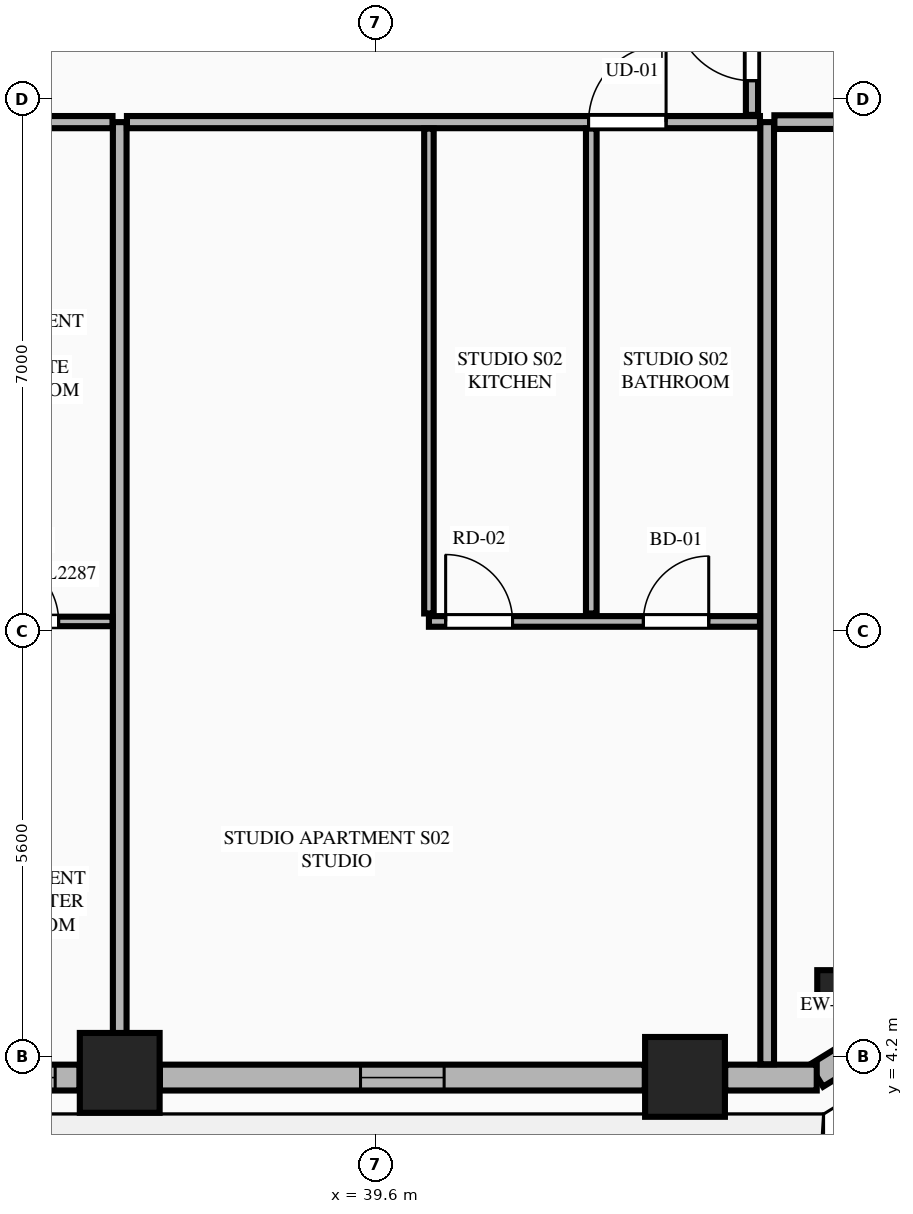
"""IFC4 building model, lengths in metres.
Left out: names, types, materials, properties, quantities, classifications, styles, units other than length and angle.
Written with IfcOpenShell. Run it as: python <this file> out.ifc"""

import sys

from ifc_helpers import new_model, si_unit, direction, frame, frame_2d, origin, origin_2d, place, context, subcontext, project, spatial, rectangle, extrude, element, fill, save


model = new_model("IFC4")
c1 = context("Model", 3, precision=1e-05, world=origin(), true_north=direction((0.0, 1.0)))
c2 = subcontext(c1, "Body", "Model", "MODEL_VIEW")
j1 = project(units=[si_unit("LENGTHUNIT", "METRE"), si_unit("PLANEANGLEUNIT", "RADIAN")], contexts=[c1])
p1 = place(None, origin())
s1 = spatial("IfcSite", under=j1, at=p1, CompositionType="ELEMENT")
p2 = place(p1, origin())
s2 = spatial("IfcBuilding", under=s1, at=p2, CompositionType="ELEMENT")
p3 = place(p2, frame((0.0, 0.0, 109.05)))
s3 = spatial("IfcBuildingStorey", under=s2, at=p3, CompositionType="ELEMENT", Elevation=109.05)
for number, where, z_axis, x_axis in (
    (1, (36.232, 3.992, 0.0), (0.0, 0.0, 1.0), (1.0, 0.0, 0.0)),
    (2, (43.669, 3.939, 0.0), (0.0, 0.0, 1.0), (1.0, 0.0, 0.0)),
):
    element("IfcColumn", number, at=place(p3, frame(where, z_axis=z_axis, x_axis=x_axis)), inside=s3, PredefinedType="COLUMN", context=c2, shape_type="SweptSolid", body=[
        extrude(rectangle(XDim=1.05, YDim=1.05, at=origin_2d()), origin(), (0.0, 0.0, 1.0), 3.55),
    ])
p4 = place(p3, frame((45.659, 5.093, 0.0), z_axis=(0.0, 0.0, 1.0), x_axis=(0.865160173452, 0.501495637342, 0.0)))
e3 = element("IfcColumn", 3, at=p4, inside=s3, PredefinedType="PILASTER", context=c2, shape_type="SweptSolid", body=[
    extrude(rectangle(XDim=0.5, YDim=0.35, at=origin_2d()), origin(), (0.0, 0.0, 1.0), 3.55),
])
p5 = place(p3, frame((45.397, 3.955, 0.0), z_axis=(0.0, 0.0, 1.0), x_axis=(0.851798915137, 0.523868884523, 0.0)))
e4 = element("IfcWall", 4, at=p5, inside=s3, PredefinedType="STANDARD", context=c2, shape_type="SweptSolid", body=[
    extrude(rectangle(XDim=1.848, YDim=0.34, at=frame_2d((0.924, 0.0))), origin(), (0.0, 0.0, 1.0), 3.34),
])
p6 = place(p3, frame((29.097, 3.93, 0.0), z_axis=(0.0, 0.0, 1.0), x_axis=(1.0, 0.0, 0.0)))
e5 = element("IfcWall", 5, at=p6, inside=s3, PredefinedType="STANDARD", context=c2, shape_type="SweptSolid", body=[
    extrude(rectangle(XDim=6.606, YDim=0.34, at=frame_2d((3.303, 0.0))), origin(), (0.0, 0.0, 1.0), 2.797),
])
p7 = place(p6, frame((1.775, 0.0, 0.0)))
e6 = element("IfcOpeningElement", 6, at=p7, cuts=e5, PredefinedType="OPENING", context=c2, shape_type="SweptSolid", body=[
    extrude(rectangle(XDim=1.1, YDim=2.25, at=frame_2d((0.55, 1.125))), frame((0.0, 0.18, 0.0), z_axis=(0.0, -1.0, 0.0), x_axis=(1.0, 0.0, 0.0)), (0.0, 0.0, 1.0), 0.36),
])
p8 = place(p6, frame((5.186, 0.0, 0.75)))
e7 = element("IfcOpeningElement", 7, at=p8, cuts=e5, PredefinedType="OPENING", context=c2, shape_type="SweptSolid", body=[
    extrude(rectangle(XDim=1.1, YDim=1.897, at=frame_2d((0.55, 0.948))), frame((0.0, 0.18, 0.0), z_axis=(0.0, -1.0, 0.0), x_axis=(1.0, 0.0, 0.0)), (0.0, 0.0, 1.0), 0.36),
])
p9 = place(p3, frame((36.761, 3.93, 0.0), z_axis=(0.0, 0.0, 1.0), x_axis=(1.0, 0.0, 0.0)))
e8 = element("IfcWall", 8, at=p9, inside=s3, PredefinedType="STANDARD", context=c2, shape_type="SweptSolid", body=[
    extrude(rectangle(XDim=6.379, YDim=0.34, at=frame_2d((3.189, 0.0))), origin(), (0.0, 0.0, 1.0), 2.797),
])
p10 = place(p9, frame((2.639, 0.0, 0.75)))
e9 = element("IfcOpeningElement", 9, at=p10, cuts=e8, PredefinedType="OPENING", context=c2, shape_type="SweptSolid", body=[
    extrude(rectangle(XDim=1.1, YDim=1.897, at=frame_2d((0.55, 0.948))), frame((0.0, 0.18, 0.0), z_axis=(0.0, -1.0, 0.0), x_axis=(1.0, 0.0, 0.0)), (0.0, 0.0, 1.0), 0.36),
])
p11 = place(p3, frame((44.198, 3.93, 0.0), z_axis=(0.0, 0.0, 1.0), x_axis=(1.0, 0.0, 0.0)))
e10 = element("IfcWall", 10, at=p11, inside=s3, PredefinedType="STANDARD", context=c2, shape_type="SweptSolid", body=[
    extrude(rectangle(XDim=1.204, YDim=0.34, at=frame_2d((0.602, 0.0))), origin(), (0.0, 0.0, 1.0), 3.34),
])
p12 = place(p3, frame((36.232, 4.105, 0.0), z_axis=(0.0, 0.0, 1.0), x_axis=(0.0, 1.0, 0.0)))
e11 = element("IfcWall", 11, at=p12, inside=s3, PredefinedType="PARTITIONING", context=c2, shape_type="SweptSolid", body=[
    extrude(rectangle(XDim=12.395, YDim=0.18, at=frame_2d((6.198, 0.0))), origin(), (0.0, 0.0, 1.0), 2.722),
])
p13 = place(p3, frame((44.75, 4.105, 0.0), z_axis=(0.0, 0.0, 1.0), x_axis=(0.0, 1.0, 0.0)))
e12 = element("IfcWall", 12, at=p13, inside=s3, PredefinedType="PARTITIONING", context=c2, shape_type="SweptSolid", body=[
    extrude(rectangle(XDim=12.395, YDim=0.18, at=frame_2d((6.198, 0.0))), origin(), (0.0, 0.0, 1.0), 3.34),
])
p14 = place(p3, frame((20.145, 16.5, 0.0), z_axis=(0.0, 0.0, 1.0), x_axis=(1.0, 0.0, 0.0)))
e13 = element("IfcWall", 13, at=p14, inside=s3, PredefinedType="PARTITIONING", context=c2, shape_type="SweptSolid", body=[
    extrude(rectangle(XDim=15.992, YDim=0.16, at=frame_2d((7.996, 0.0))), origin(), (0.0, 0.0, 1.0), 3.34),
])
p15 = place(p14, frame((0.405, 0.0, 0.0)))
e14 = element("IfcOpeningElement", 14, at=p15, cuts=e13, PredefinedType="OPENING", context=c2, shape_type="SweptSolid", body=[
    extrude(rectangle(XDim=1.35, YDim=2.35, at=frame_2d((0.675, 1.175))), frame((0.0, 0.09, 0.0), z_axis=(0.0, -1.0, 0.0), x_axis=(1.0, 0.0, 0.0)), (0.0, 0.0, 1.0), 0.18),
])
p16 = place(p3, frame((33.85, 9.931, 0.0), z_axis=(0.0, 0.0, 1.0), x_axis=(1.0, 0.0, 0.0)))
e15 = element("IfcWall", 15, at=p16, inside=s3, PredefinedType="PARTITIONING", context=c2, shape_type="SweptSolid", body=[
    extrude(rectangle(XDim=2.287, YDim=0.125, at=frame_2d((1.144, 0.0))), origin(), (0.0, 0.0, 1.0), 3.34),
])
p17 = place(p16, frame((0.718, 0.0, 0.0)))
e16 = element("IfcOpeningElement", 16, at=p17, cuts=e15, PredefinedType="OPENING", context=c2, shape_type="SweptSolid", body=[
    extrude(rectangle(XDim=0.86, YDim=2.1, at=frame_2d((0.43, 1.05))), frame((0.0, 0.073, 0.0), z_axis=(0.0, -1.0, 0.0), x_axis=(1.0, 0.0, 0.0)), (0.0, 0.0, 1.0), 0.145),
])
p18 = place(p3, frame((36.327, 16.5, 0.0), z_axis=(0.0, 0.0, 1.0), x_axis=(1.0, 0.0, 0.0)))
e17 = element("IfcWall", 17, at=p18, inside=s3, PredefinedType="PARTITIONING", context=c2, shape_type="SweptSolid", body=[
    extrude(rectangle(XDim=8.328, YDim=0.16, at=frame_2d((4.164, 0.0))), origin(), (0.0, 0.0, 1.0), 3.34),
])
p19 = place(p18, frame((6.073, 0.0, 0.0)))
e18 = element("IfcOpeningElement", 18, at=p19, cuts=e17, PredefinedType="OPENING", context=c2, shape_type="SweptSolid", body=[
    extrude(rectangle(XDim=1.02, YDim=2.25, at=frame_2d((0.51, 1.125))), frame((0.0, 0.09, 0.0), z_axis=(0.0, -1.0, 0.0), x_axis=(1.0, 0.0, 0.0)), (0.0, 0.0, 1.0), 0.18),
])
p20 = place(p3, frame((40.3, 10.036, 0.0), z_axis=(0.0, 0.0, 1.0), x_axis=(0.0, 1.0, 0.0)))
e19 = element("IfcWall", 19, at=p20, inside=s3, PredefinedType="PARTITIONING", context=c2, shape_type="SweptSolid", body=[
    extrude(rectangle(XDim=6.379, YDim=0.125, at=frame_2d((3.189, 0.0))), origin(), (0.0, 0.0, 1.0), 3.34),
])
p21 = place(p3, frame((40.3, 9.931, 0.0), z_axis=(0.0, 0.0, 1.0), x_axis=(1.0, 0.0, 0.0)))
e20 = element("IfcWall", 20, at=p21, inside=s3, PredefinedType="PLUMBINGWALL", context=c2, shape_type="SweptSolid", body=[
    extrude(rectangle(XDim=4.355, YDim=0.14, at=frame_2d((2.177, 0.0))), origin(), (0.0, 0.0, 1.0), 3.34),
])
p22 = place(p21, frame((2.821, 0.0, 0.0)))
e21 = element("IfcOpeningElement", 21, at=p22, cuts=e20, PredefinedType="OPENING", context=c2, shape_type="SweptSolid", body=[
    extrude(rectangle(XDim=0.86, YDim=2.1, at=frame_2d((0.43, 1.05))), frame((0.0, 0.08, 0.0), z_axis=(0.0, -1.0, 0.0), x_axis=(1.0, 0.0, 0.0)), (0.0, 0.0, 1.0), 0.16),
])
p23 = place(p21, frame((0.22, 0.0, 0.0)))
e22 = element("IfcOpeningElement", 22, at=p23, cuts=e20, PredefinedType="OPENING", context=c2, shape_type="SweptSolid", body=[
    extrude(rectangle(XDim=0.88, YDim=2.15, at=frame_2d((0.44, 1.075))), frame((0.0, 0.08, 0.0), z_axis=(0.0, -1.0, 0.0), x_axis=(1.0, 0.0, 0.0)), (0.0, 0.0, 1.0), 0.16),
])
p24 = place(p3, frame((42.436, 10.036, 0.0), z_axis=(0.0, 0.0, 1.0), x_axis=(0.0, 1.0, 0.0)))
e23 = element("IfcWall", 23, at=p24, inside=s3, PredefinedType="PLUMBINGWALL", context=c2, shape_type="SweptSolid", body=[
    extrude(rectangle(XDim=6.379, YDim=0.14, at=frame_2d((3.189, 0.0))), origin(), (0.0, 0.0, 1.0), 2.722),
])
p25 = place(p3, frame((44.845, 16.5, 0.0), z_axis=(0.0, 0.0, 1.0), x_axis=(1.0, 0.0, 0.0)))
e24 = element("IfcWall", 24, at=p25, inside=s3, PredefinedType="PARTITIONING", context=c2, shape_type="SweptSolid", body=[
    extrude(rectangle(XDim=7.77, YDim=0.18, at=frame_2d((3.885, 0.0))), origin(), (0.0, 0.0, 1.0), 3.34),
])
p26 = place(p3, frame((44.55, 16.595, 0.0), z_axis=(0.0, 0.0, 1.0), x_axis=(0.0, 1.0, 0.0)))
e25 = element("IfcWall", 25, at=p26, inside=s3, PredefinedType="PARTITIONING", context=c2, shape_type="SweptSolid", body=[
    extrude(rectangle(XDim=9.586, YDim=0.16, at=frame_2d((4.793, 0.0))), origin(), (0.0, 0.0, 1.0), 3.34),
])
p27 = place(p26, frame((0.45, 0.0, 0.0)))
e26 = element("IfcOpeningElement", 26, at=p27, cuts=e25, PredefinedType="OPENING", context=c2, shape_type="SweptSolid", body=[
    extrude(rectangle(XDim=1.02, YDim=2.25, at=frame_2d((0.51, 1.125))), frame((0.0, 0.09, 0.0), z_axis=(0.0, -1.0, 0.0), x_axis=(1.0, 0.0, 0.0)), (0.0, 0.0, 1.0), 0.18),
])
p28 = place(p10, origin())
e27 = element("IfcWindow", 27, at=p28, inside=s3, PartitioningType="SINGLE_PANEL", PredefinedType="WINDOW", context=c2, shape_type="SweptSolid", body=[
    extrude(rectangle(XDim=1.1, YDim=1.897, at=frame_2d((0.55, 0.948))), frame((0.0, 0.03, 0.0), z_axis=(0.0, -1.0, 0.0), x_axis=(1.0, 0.0, 0.0)), (0.0, 0.0, 1.0), 0.06),
])
fill(e9, e27)
p29 = place(p17, origin())
e28 = element("IfcDoor", 28, at=p29, inside=s3, OperationType="SINGLE_SWING_LEFT", PredefinedType="DOOR", context=c2, shape_type="SweptSolid", body=[
    extrude(rectangle(XDim=0.86, YDim=2.1, at=frame_2d((0.43, 1.05))), frame((0.0, 0.025, 0.0), z_axis=(0.0, -1.0, 0.0), x_axis=(1.0, 0.0, 0.0)), (0.0, 0.0, 1.0), 0.05),
])
fill(e16, e28)
p30 = place(p22, origin())
e29 = element("IfcDoor", 29, at=p30, inside=s3, OperationType="SINGLE_SWING_RIGHT", PredefinedType="DOOR", context=c2, shape_type="SweptSolid", body=[
    extrude(rectangle(XDim=0.86, YDim=2.1, at=frame_2d((0.43, 1.05))), frame((0.0, 0.025, 0.0), z_axis=(0.0, -1.0, 0.0), x_axis=(1.0, 0.0, 0.0)), (0.0, 0.0, 1.0), 0.05),
])
fill(e21, e29)
p31 = place(p19, origin())
e30 = element("IfcDoor", 30, at=p31, inside=s3, OperationType="SINGLE_SWING_RIGHT", PredefinedType="DOOR", context=c2, shape_type="SweptSolid", body=[
    extrude(rectangle(XDim=1.02, YDim=2.25, at=frame_2d((0.51, 1.125))), frame((0.0, 0.025, 0.0), z_axis=(0.0, -1.0, 0.0), x_axis=(1.0, 0.0, 0.0)), (0.0, 0.0, 1.0), 0.05),
])
fill(e18, e30)
p32 = place(p23, origin())
e31 = element("IfcDoor", 31, at=p32, inside=s3, OperationType="SINGLE_SWING_LEFT", PredefinedType="DOOR", context=c2, shape_type="SweptSolid", body=[
    extrude(rectangle(XDim=0.88, YDim=2.15, at=frame_2d((0.44, 1.075))), frame((0.0, 0.025, 0.0), z_axis=(0.0, -1.0, 0.0), x_axis=(1.0, 0.0, 0.0)), (0.0, 0.0, 1.0), 0.05),
])
fill(e22, e31)
p33 = place(p27, origin())
e32 = element("IfcDoor", 32, at=p33, inside=s3, OperationType="SINGLE_SWING_RIGHT", PredefinedType="DOOR", context=c2, shape_type="SweptSolid", body=[
    extrude(rectangle(XDim=1.02, YDim=2.25, at=frame_2d((0.51, 1.125))), frame((0.0, 0.025, 0.0), z_axis=(0.0, -1.0, 0.0), x_axis=(1.0, 0.0, 0.0)), (0.0, 0.0, 1.0), 0.05),
])
fill(e26, e32)
p34 = place(p8, origin())
e33 = element("IfcWindow", 33, at=p34, inside=s3, PartitioningType="SINGLE_PANEL", PredefinedType="WINDOW", context=c2, shape_type="SweptSolid", body=[
    extrude(rectangle(XDim=1.1, YDim=1.897, at=frame_2d((0.55, 0.948))), frame((0.0, 0.03, 0.0), z_axis=(0.0, -1.0, 0.0), x_axis=(1.0, 0.0, 0.0)), (0.0, 0.0, 1.0), 0.06),
])
fill(e7, e33)
save(model, sys.argv[1])
